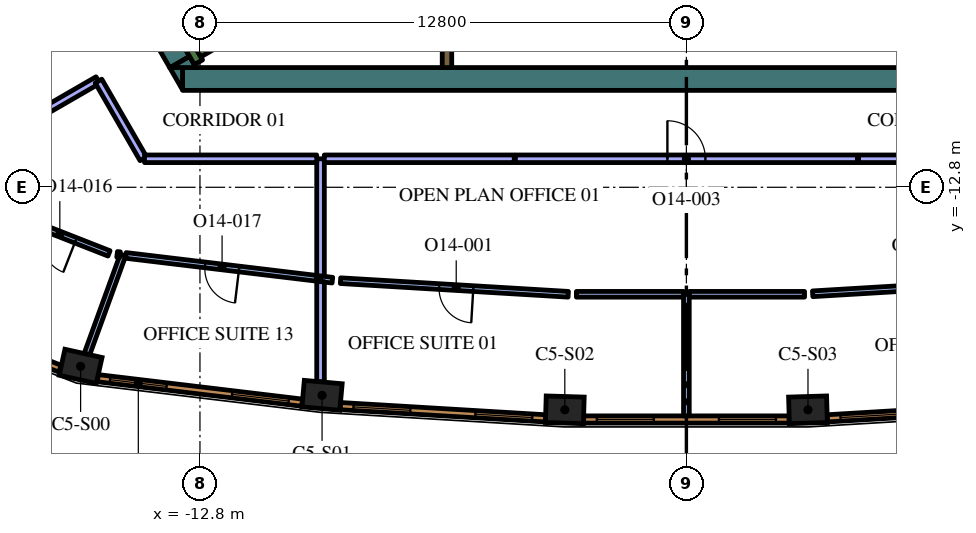
"""IFC4 building model, lengths in metres.
Left out: names, types, materials, properties, quantities, classifications, styles, units other than length and angle.
Written with IfcOpenShell. Run it as: python <this file> out.ifc"""

import sys

from ifc_helpers import new_model, si_unit, direction, frame, frame_2d, origin, origin_2d, place, context, subcontext, project, spatial, polyline, rectangle, outline, extrude, element, fill, save


model = new_model("IFC4")
c1 = context("Model", 3, precision=1e-05, world=origin(), true_north=direction((0.0, 1.0)))
c2 = subcontext(c1, "Body", "Model", "MODEL_VIEW")
j1 = project(units=[si_unit("LENGTHUNIT", "METRE"), si_unit("PLANEANGLEUNIT", "RADIAN")], contexts=[c1])
p1 = place(None, origin())
s1 = spatial("IfcSite", under=j1, at=p1, CompositionType="ELEMENT")
p2 = place(p1, origin())
s2 = spatial("IfcBuilding", under=s1, at=p2, CompositionType="ELEMENT")
p3 = place(p2, frame((0.0, 0.0, 309.0)))
s3 = spatial("IfcBuildingStorey", under=s2, at=p3, CompositionType="ELEMENT", Elevation=309.0)
for number, where, z_axis, x_axis in (
    (1, (-15.941, -17.512, 0.0), (0.0, 0.0, 1.0), (0.976, -0.217, 0.0)),
    (2, (-9.587, -18.274, 0.0), (0.0, 0.0, 1.0), (0.996, -0.089, 0.0)),
    (3, (-3.199, -18.655, 0.0), (0.0, 0.0, 1.0), (1.0, -0.03, 0.0)),
    (4, (3.199, -18.655, 0.0), (0.0, 0.0, 1.0), (1.0, 0.03, 0.0)),
):
    element("IfcColumn", number, at=place(p3, frame(where, z_axis=z_axis, x_axis=x_axis)), inside=s3, PredefinedType="COLUMN", context=c2, shape_type="SweptSolid", body=[
        extrude(rectangle(XDim=1.0, YDim=0.7, at=origin_2d()), origin(), (0.0, 0.0, 1.0), 4.2),
    ])
p4 = place(p3, frame((8.904, -9.95, 0.0), z_axis=(0.0, 0.0, 1.0), x_axis=(-1.0, 0.0, 0.0)))
e5 = element("IfcWall", 5, at=p4, inside=s3, PredefinedType="SOLIDWALL", context=c2, shape_type="SweptSolid", body=[
    extrude(rectangle(XDim=22.161, YDim=0.6, at=frame_2d((11.081, 0.0))), origin(), (0.0, 0.0, 1.0), 4.2),
])
p5 = place(p3, origin())
e6 = element("IfcWall", 6, at=p5, inside=s3, PredefinedType="SOLIDWALL", context=c2, shape_type="SweptSolid", body=[
    extrude(outline(polyline([(-13.597, -9.65), (-13.259, -9.65), (-13.259, -10.236), (-13.597, -9.65)])), origin(), (0.0, 0.0, 1.0), 4.2),
])
p6 = place(p3, frame((-13.333, -9.506, 0.0), z_axis=(0.0, 0.0, 1.0), x_axis=(-0.500019073792, 0.866014391245, 0.0)))
e7 = element("IfcWall", 7, at=p6, inside=s3, PredefinedType="SOLIDWALL", context=c2, shape_type="SweptSolid", body=[
    extrude(rectangle(XDim=3.823, YDim=0.6, at=frame_2d((1.912, 0.0))), origin(), (0.0, 0.0, 1.0), 4.2),
])
e8 = element("IfcWall", 8, at=p5, inside=s3, PredefinedType="SOLIDWALL", context=c2, shape_type="SweptSolid", body=[
    extrude(outline(polyline([(-12.904, -9.65), (-13.58, -9.65), (-13.073, -9.357), (-12.904, -9.65)])), origin(), (0.0, 0.0, 1.0), 4.2),
])
p7 = place(p3, frame((-12.84, -9.511, 0.0), z_axis=(0.0, 0.0, 1.0), x_axis=(-0.499997733992, 0.866026712061, 0.0)))
e9 = element("IfcWall", 9, at=p7, inside=s3, PredefinedType="SOLIDWALL", context=c2, shape_type="SweptSolid", body=[
    extrude(rectangle(XDim=3.634, YDim=0.25, at=frame_2d((1.817, 0.0))), origin(), (0.0, 0.0, 1.0), 4.2),
])
p8 = place(p3, frame((-12.84, -9.261, 0.0), z_axis=(0.0, 0.0, 1.0), x_axis=(0.866016039709, 0.500016218704, 0.0)))
e10 = element("IfcWall", 10, at=p8, inside=s3, PredefinedType="SOLIDWALL", context=c2, shape_type="SweptSolid", body=[
    extrude(rectangle(XDim=7.05, YDim=0.25, at=frame_2d((3.525, 0.0))), origin(), (0.0, 0.0, 1.0), 4.2),
])
p9 = place(p3, frame((-6.3, -8.925, 0.0), z_axis=(0.0, 0.0, 1.0), x_axis=(0.0, -1.0, 0.0)))
e11 = element("IfcWall", 11, at=p9, inside=s3, PredefinedType="SOLIDWALL", context=c2, shape_type="SweptSolid", body=[
    extrude(rectangle(XDim=0.725, YDim=0.25, at=frame_2d((0.363, 0.0))), origin(), (0.0, 0.0, 1.0), 4.2),
])
p10 = place(p3, frame((0.0, -15.615, 0.0), z_axis=(0.0, 0.0, 1.0), x_axis=(0.0, -1.0, 0.0)))
e12 = element("IfcWall", 12, at=p10, inside=s3, PredefinedType="PARTITIONING", context=c2, shape_type="SweptSolid", body=[
    extrude(rectangle(XDim=3.2, YDim=0.15, at=frame_2d((1.6, 0.0))), origin(), (0.0, 0.0, 1.0), 3.55),
])
p11 = place(p3, frame((-9.627, -15.207, 0.0), z_axis=(0.0, 0.0, 1.0), x_axis=(0.992909886905, -0.118869493503, 0.0)))
e13 = element("IfcWall", 13, at=p11, inside=s3, PredefinedType="PARTITIONING", context=c2, shape_type="SweptSolid", body=[
    extrude(rectangle(XDim=0.314, YDim=0.15, at=frame_2d((0.157, 0.0))), origin(), (0.0, 0.0, 1.0), 3.55),
])
p12 = place(p3, frame((-3.109, -15.615, 0.0), z_axis=(0.0, 0.0, 1.0), x_axis=(-0.998221243398, 0.059618363188, 0.0)))
e14 = element("IfcWall", 14, at=p12, inside=s3, PredefinedType="PARTITIONING", context=c2, shape_type="SweptSolid", body=[
    extrude(rectangle(XDim=6.003, YDim=0.15, at=frame_2d((3.002, 0.0))), origin(), (0.0, 0.0, 1.0), 3.55),
])
p13 = place(p12, frame((2.503, 0.0, 0.0)))
e15 = element("IfcOpeningElement", 15, at=p13, cuts=e14, PredefinedType="OPENING", context=c2, shape_type="SweptSolid", body=[
    extrude(rectangle(XDim=0.9, YDim=2.1, at=frame_2d((0.45, 1.05))), frame((0.0, 0.085, 0.0), z_axis=(0.0, -1.0, 0.0), x_axis=(1.0, 0.0, 0.0)), (0.0, 0.0, 1.0), 0.17),
])
p14 = place(p3, frame((-2.895, -15.615, 0.0), z_axis=(0.0, 0.0, 1.0), x_axis=(1.0, 0.0, 0.0)))
e16 = element("IfcWall", 16, at=p14, inside=s3, PredefinedType="PARTITIONING", context=c2, shape_type="SweptSolid", body=[
    extrude(rectangle(XDim=2.82, YDim=0.15, at=frame_2d((1.41, 0.0))), origin(), (0.0, 0.0, 1.0), 3.55),
])
p15 = place(p3, frame((-9.627, -17.919, 0.0), z_axis=(0.0, 0.0, 1.0), x_axis=(0.0, 1.0, 0.0)))
e17 = element("IfcWall", 17, at=p15, inside=s3, PredefinedType="PARTITIONING", context=c2, shape_type="SweptSolid", body=[
    extrude(rectangle(XDim=2.636, YDim=0.2, at=frame_2d((1.318, 0.0))), origin(), (0.0, 0.0, 1.0), 3.55),
])
p16 = place(p3, frame((0.075, -15.615, 0.0), z_axis=(0.0, 0.0, 1.0), x_axis=(1.0, 0.0, 0.0)))
e18 = element("IfcWall", 18, at=p16, inside=s3, PredefinedType="PARTITIONING", context=c2, shape_type="SweptSolid", body=[
    extrude(rectangle(XDim=3.034, YDim=0.15, at=frame_2d((1.517, 0.0))), origin(), (0.0, 0.0, 1.0), 3.55),
])
p17 = place(p3, frame((9.315, -15.244, 0.0), z_axis=(0.0, 0.0, 1.0), x_axis=(-0.998218822372, -0.059658885864, 0.0)))
e19 = element("IfcWall", 19, at=p17, inside=s3, PredefinedType="PARTITIONING", context=c2, shape_type="SweptSolid", body=[
    extrude(rectangle(XDim=6.003, YDim=0.15, at=frame_2d((3.002, 0.0))), origin(), (0.0, 0.0, 1.0), 3.55),
])
p18 = place(p17, frame((2.503, 0.0, 0.0)))
e20 = element("IfcOpeningElement", 20, at=p18, cuts=e19, PredefinedType="OPENING", context=c2, shape_type="SweptSolid", body=[
    extrude(rectangle(XDim=0.9, YDim=2.1, at=frame_2d((0.45, 1.05))), frame((0.0, 0.085, 0.0), z_axis=(0.0, -1.0, 0.0), x_axis=(1.0, 0.0, 0.0)), (0.0, 0.0, 1.0), 0.17),
])
p19 = place(p3, frame((-9.627, -15.132, 0.0), z_axis=(0.0, 0.0, 1.0), x_axis=(0.0, 1.0, 0.0)))
e21 = element("IfcWall", 21, at=p19, inside=s3, PredefinedType="PARTITIONING", context=c2, shape_type="SweptSolid", body=[
    extrude(rectangle(XDim=3.082, YDim=0.2, at=frame_2d((1.541, 0.0))), origin(), (0.0, 0.0, 1.0), 3.55),
])
p20 = place(p3, frame((-4.5, -12.05, 0.0), z_axis=(0.0, 0.0, 1.0), x_axis=(1.0, 0.0, 0.0)))
e22 = element("IfcWall", 22, at=p20, inside=s3, PredefinedType="PARTITIONING", context=c2, shape_type="SweptSolid", body=[
    extrude(rectangle(XDim=9.0, YDim=0.2, at=frame_2d((4.5, 0.0))), origin(), (0.0, 0.0, 1.0), 3.55),
])
p21 = place(p20, frame((4.0, 0.0, 0.0)))
e23 = element("IfcOpeningElement", 23, at=p21, cuts=e22, PredefinedType="OPENING", context=c2, shape_type="SweptSolid", body=[
    extrude(rectangle(XDim=1.0, YDim=2.1, at=frame_2d((0.5, 1.05))), frame((0.0, 0.11, 0.0), z_axis=(0.0, -1.0, 0.0), x_axis=(1.0, 0.0, 0.0)), (0.0, 0.0, 1.0), 0.22),
])
for number, where, z_axis, x_axis in (
    (24, (-9.527, -12.05, 0.0), (0.0, 0.0, 1.0), (1.0, 0.0, 0.0)),
    (25, (4.53, -12.05, 0.0), (0.0, 0.0, 1.0), (1.0, 0.0, 0.0)),
):
    element("IfcWall", number, at=place(p3, frame(where, z_axis=z_axis, x_axis=x_axis)), inside=s3, PredefinedType="PARTITIONING", context=c2, shape_type="SweptSolid", body=[
        extrude(rectangle(XDim=4.997, YDim=0.2, at=frame_2d((2.499, 0.0))), origin(), (0.0, 0.0, 1.0), 3.55),
    ])
p22 = place(p3, frame((-14.826, -14.584, 0.0), z_axis=(0.0, 0.0, 1.0), x_axis=(-0.341806672652, -0.9397702903, 0.0)))
e26 = element("IfcWall", 26, at=p22, inside=s3, PredefinedType="PARTITIONING", context=c2, shape_type="SweptSolid", body=[
    extrude(rectangle(XDim=2.773, YDim=0.15, at=frame_2d((1.387, 0.0))), origin(), (0.0, 0.0, 1.0), 3.55),
])
p23 = place(p3, frame((-15.193, -14.54, 0.0), z_axis=(0.0, 0.0, 1.0), x_axis=(-0.930968616147, 0.36509921357, 0.0)))
e27 = element("IfcWall", 27, at=p23, inside=s3, PredefinedType="PARTITIONING", context=c2, shape_type="SweptSolid", body=[
    extrude(rectangle(XDim=2.841, YDim=0.15, at=frame_2d((1.42, 0.0))), origin(), (0.0, 0.0, 1.0), 3.55),
])
p24 = place(p23, frame((0.941, 0.0, 0.0)))
e28 = element("IfcOpeningElement", 28, at=p24, cuts=e27, PredefinedType="OPENING", context=c2, shape_type="SweptSolid", body=[
    extrude(rectangle(XDim=0.9, YDim=2.1, at=frame_2d((0.45, 1.05))), frame((0.0, 0.085, 0.0), z_axis=(0.0, -1.0, 0.0), x_axis=(1.0, 0.0, 0.0)), (0.0, 0.0, 1.0), 0.17),
])
p25 = place(p3, frame((-14.98, -14.565, 0.0), z_axis=(0.0, 0.0, 1.0), x_axis=(0.992847073299, -0.119393002485, 0.0)))
e29 = element("IfcWall", 29, at=p25, inside=s3, PredefinedType="PARTITIONING", context=c2, shape_type="SweptSolid", body=[
    extrude(rectangle(XDim=0.078, YDim=0.15, at=frame_2d((0.039, 0.0))), origin(), (0.0, 0.0, 1.0), 3.55),
])
p26 = place(p3, frame((-9.727, -15.195, 0.0), z_axis=(0.0, 0.0, 1.0), x_axis=(-0.992892587246, 0.119013907556, 0.0)))
e30 = element("IfcWall", 30, at=p26, inside=s3, PredefinedType="PARTITIONING", context=c2, shape_type="SweptSolid", body=[
    extrude(rectangle(XDim=5.059, YDim=0.15, at=frame_2d((2.529, 0.0))), origin(), (0.0, 0.0, 1.0), 3.55),
])
p27 = place(p26, frame((2.059, 0.0, 0.0)))
e31 = element("IfcOpeningElement", 31, at=p27, cuts=e30, PredefinedType="OPENING", context=c2, shape_type="SweptSolid", body=[
    extrude(rectangle(XDim=0.9, YDim=2.1, at=frame_2d((0.45, 1.05))), frame((0.0, 0.085, 0.0), z_axis=(0.0, -1.0, 0.0), x_axis=(1.0, 0.0, 0.0)), (0.0, 0.0, 1.0), 0.17),
])
for number, where, z_axis, x_axis in (
    (32, (-16.411, -8.436, 0.0), (0.0, 0.0, 1.0), (-0.866, -0.5, 0.0)),
    (33, (-17.364, -11.064, 0.0), (0.0, 0.0, 1.0), (0.866, 0.5, 0.0)),
):
    element("IfcWall", number, at=place(p3, frame(where, z_axis=z_axis, x_axis=x_axis)), inside=s3, PredefinedType="PARTITIONING", context=c2, shape_type="SweptSolid", body=[
        extrude(rectangle(XDim=2.17, YDim=0.2, at=frame_2d((1.085, 0.0))), origin(), (0.0, 0.0, 1.0), 3.55),
    ])
p28 = place(p3, frame((-15.47, -10.005, 0.0), z_axis=(0.0, 0.0, 1.0), x_axis=(0.500053625724, -0.865994440744, 0.0)))
e34 = element("IfcWall", 34, at=p28, inside=s3, PredefinedType="PARTITIONING", context=c2, shape_type="SweptSolid", body=[
    extrude(rectangle(XDim=2.361, YDim=0.2, at=frame_2d((1.181, 0.0))), origin(), (0.0, 0.0, 1.0), 3.55),
])
p29 = place(p3, frame((-14.26, -12.05, 0.0), z_axis=(0.0, 0.0, 1.0), x_axis=(1.0, 0.0, 0.0)))
e35 = element("IfcWall", 35, at=p29, inside=s3, PredefinedType="PARTITIONING", context=c2, shape_type="SweptSolid", body=[
    extrude(rectangle(XDim=4.532, YDim=0.2, at=frame_2d((2.266, 0.0))), origin(), (0.0, 0.0, 1.0), 3.55),
])
p30 = place(p3, frame((-15.487, -17.823, 0.0), z_axis=(0.0, 0.0, 1.0), x_axis=(0.992885582795, -0.119072328769, 0.0)))
e36 = element("IfcWall", 36, at=p30, inside=s3, PredefinedType="SOLIDWALL", context=c2, shape_type="SweptSolid", body=[
    extrude(rectangle(XDim=5.415, YDim=0.19, at=frame_2d((2.708, 0.0))), origin(), (0.0, 0.0, 1.0), 3.95),
])
p31 = place(p30, frame((0.323, 0.0, 0.6)))
e37 = element("IfcOpeningElement", 37, at=p31, cuts=e36, PredefinedType="OPENING", context=c2, shape_type="SweptSolid", body=[
    extrude(rectangle(XDim=1.5, YDim=2.85, at=frame_2d((0.75, 1.425))), frame((0.0, 0.105, 0.0), z_axis=(0.0, -1.0, 0.0), x_axis=(1.0, 0.0, 0.0)), (0.0, 0.0, 1.0), 0.21),
])
p32 = place(p30, frame((3.558, 0.0, 0.6)))
e38 = element("IfcOpeningElement", 38, at=p32, cuts=e36, PredefinedType="OPENING", context=c2, shape_type="SweptSolid", body=[
    extrude(rectangle(XDim=1.5, YDim=2.85, at=frame_2d((0.75, 1.425))), frame((0.0, 0.105, 0.0), z_axis=(0.0, -1.0, 0.0), x_axis=(1.0, 0.0, 0.0)), (0.0, 0.0, 1.0), 0.21),
])
p33 = place(p3, frame((-9.107, -18.558, 0.0), z_axis=(0.0, 0.0, 1.0), x_axis=(0.998221492823, -0.059614186786, 0.0)))
e39 = element("IfcWall", 39, at=p33, inside=s3, PredefinedType="SOLIDWALL", context=c2, shape_type="SweptSolid", body=[
    extrude(rectangle(XDim=5.406, YDim=0.19, at=frame_2d((2.703, 0.0))), origin(), (0.0, 0.0, 1.0), 3.95),
])
p34 = place(p33, frame((0.346, 0.0, 0.6)))
e40 = element("IfcOpeningElement", 40, at=p34, cuts=e39, PredefinedType="OPENING", context=c2, shape_type="SweptSolid", body=[
    extrude(rectangle(XDim=1.5, YDim=2.85, at=frame_2d((0.75, 1.425))), frame((0.0, 0.105, 0.0), z_axis=(0.0, -1.0, 0.0), x_axis=(1.0, 0.0, 0.0)), (0.0, 0.0, 1.0), 0.21),
])
p35 = place(p33, frame((3.559, 0.0, 0.6)))
e41 = element("IfcOpeningElement", 41, at=p35, cuts=e39, PredefinedType="OPENING", context=c2, shape_type="SweptSolid", body=[
    extrude(rectangle(XDim=1.5, YDim=2.85, at=frame_2d((0.75, 1.425))), frame((0.0, 0.105, 0.0), z_axis=(0.0, -1.0, 0.0), x_axis=(1.0, 0.0, 0.0)), (0.0, 0.0, 1.0), 0.21),
])
p36 = place(p3, frame((-2.703, -18.91, 0.0), z_axis=(0.0, 0.0, 1.0), x_axis=(1.0, 0.0, 0.0)))
e42 = element("IfcWall", 42, at=p36, inside=s3, PredefinedType="SOLIDWALL", context=c2, shape_type="SweptSolid", body=[
    extrude(rectangle(XDim=5.406, YDim=0.19, at=frame_2d((2.703, 0.0))), origin(), (0.0, 0.0, 1.0), 3.95),
])
p37 = place(p36, frame((0.346, 0.0, 0.6)))
e43 = element("IfcOpeningElement", 43, at=p37, cuts=e42, PredefinedType="OPENING", context=c2, shape_type="SweptSolid", body=[
    extrude(rectangle(XDim=1.5, YDim=2.85, at=frame_2d((0.75, 1.425))), frame((0.0, 0.105, 0.0), z_axis=(0.0, -1.0, 0.0), x_axis=(1.0, 0.0, 0.0)), (0.0, 0.0, 1.0), 0.21),
])
p38 = place(p36, frame((3.56, 0.0, 0.6)))
e44 = element("IfcOpeningElement", 44, at=p38, cuts=e42, PredefinedType="OPENING", context=c2, shape_type="SweptSolid", body=[
    extrude(rectangle(XDim=1.5, YDim=2.85, at=frame_2d((0.75, 1.425))), frame((0.0, 0.105, 0.0), z_axis=(0.0, -1.0, 0.0), x_axis=(1.0, 0.0, 0.0)), (0.0, 0.0, 1.0), 0.21),
])
p39 = place(p3, frame((3.71, -18.88, 0.0), z_axis=(0.0, 0.0, 1.0), x_axis=(0.998221492823, 0.059614186786, 0.0)))
e45 = element("IfcWall", 45, at=p39, inside=s3, PredefinedType="SOLIDWALL", context=c2, shape_type="SweptSolid", body=[
    extrude(rectangle(XDim=5.406, YDim=0.19, at=frame_2d((2.703, 0.0))), origin(), (0.0, 0.0, 1.0), 3.95),
])
p40 = place(p39, frame((0.346, 0.0, 0.6)))
e46 = element("IfcOpeningElement", 46, at=p40, cuts=e45, PredefinedType="OPENING", context=c2, shape_type="SweptSolid", body=[
    extrude(rectangle(XDim=1.5, YDim=2.85, at=frame_2d((0.75, 1.425))), frame((0.0, 0.105, 0.0), z_axis=(0.0, -1.0, 0.0), x_axis=(1.0, 0.0, 0.0)), (0.0, 0.0, 1.0), 0.21),
])
p41 = place(p39, frame((3.559, 0.0, 0.6)))
e47 = element("IfcOpeningElement", 47, at=p41, cuts=e45, PredefinedType="OPENING", context=c2, shape_type="SweptSolid", body=[
    extrude(rectangle(XDim=1.5, YDim=2.85, at=frame_2d((0.75, 1.425))), frame((0.0, 0.105, 0.0), z_axis=(0.0, -1.0, 0.0), x_axis=(1.0, 0.0, 0.0)), (0.0, 0.0, 1.0), 0.21),
])
p42 = place(p3, frame((-19.496, -16.392, 0.0), z_axis=(0.0, 0.0, 1.0), x_axis=(0.93100888477, -0.364996515709, 0.0)))
e48 = element("IfcWall", 48, at=p42, inside=s3, PredefinedType="SOLIDWALL", context=c2, shape_type="SweptSolid", body=[
    extrude(rectangle(XDim=3.237, YDim=0.19, at=frame_2d((1.618, 0.0))), origin(), (0.0, 0.0, 1.0), 3.95),
])
p43 = place(p42, frame((1.068, 0.0, 0.6)))
e49 = element("IfcOpeningElement", 49, at=p43, cuts=e48, PredefinedType="OPENING", context=c2, shape_type="SweptSolid", body=[
    extrude(rectangle(XDim=1.1, YDim=2.85, at=frame_2d((0.55, 1.425))), frame((0.0, 0.105, 0.0), z_axis=(0.0, -1.0, 0.0), x_axis=(1.0, 0.0, 0.0)), (0.0, 0.0, 1.0), 0.21),
])
p44 = place(p13, origin())
e50 = element("IfcDoor", 50, at=p44, inside=s3, OperationType="SINGLE_SWING_LEFT", PredefinedType="DOOR", context=c2, shape_type="SweptSolid", body=[
    extrude(rectangle(XDim=0.9, YDim=2.1, at=frame_2d((0.45, 1.05))), frame((0.0, 0.025, 0.0), z_axis=(0.0, -1.0, 0.0), x_axis=(1.0, 0.0, 0.0)), (0.0, 0.0, 1.0), 0.05),
])
fill(e15, e50)
p45 = place(p21, origin())
e51 = element("IfcDoor", 51, at=p45, inside=s3, OperationType="SINGLE_SWING_RIGHT", PredefinedType="DOOR", context=c2, shape_type="SweptSolid", body=[
    extrude(rectangle(XDim=1.0, YDim=2.1, at=frame_2d((0.5, 1.05))), frame((0.0, 0.025, 0.0), z_axis=(0.0, -1.0, 0.0), x_axis=(1.0, 0.0, 0.0)), (0.0, 0.0, 1.0), 0.05),
])
fill(e23, e51)
p46 = place(p24, origin())
e52 = element("IfcDoor", 52, at=p46, inside=s3, OperationType="SINGLE_SWING_LEFT", PredefinedType="DOOR", context=c2, shape_type="SweptSolid", body=[
    extrude(rectangle(XDim=0.9, YDim=2.1, at=frame_2d((0.45, 1.05))), frame((0.0, 0.025, 0.0), z_axis=(0.0, -1.0, 0.0), x_axis=(1.0, 0.0, 0.0)), (0.0, 0.0, 1.0), 0.05),
])
fill(e28, e52)
p47 = place(p27, origin())
e53 = element("IfcDoor", 53, at=p47, inside=s3, OperationType="SINGLE_SWING_LEFT", PredefinedType="DOOR", context=c2, shape_type="SweptSolid", body=[
    extrude(rectangle(XDim=0.9, YDim=2.1, at=frame_2d((0.45, 1.05))), frame((0.0, 0.025, 0.0), z_axis=(0.0, -1.0, 0.0), x_axis=(1.0, 0.0, 0.0)), (0.0, 0.0, 1.0), 0.05),
])
fill(e31, e53)
p48 = place(p31, origin())
e54 = element("IfcWindow", 54, at=p48, inside=s3, PartitioningType="SINGLE_PANEL", PredefinedType="WINDOW", context=c2, shape_type="SweptSolid", body=[
    extrude(rectangle(XDim=1.5, YDim=2.85, at=frame_2d((0.75, 1.425))), frame((0.0, 0.045, 0.0), z_axis=(0.0, -1.0, 0.0), x_axis=(1.0, 0.0, 0.0)), (0.0, 0.0, 1.0), 0.06),
])
fill(e37, e54)
p49 = place(p32, origin())
e55 = element("IfcWindow", 55, at=p49, inside=s3, PartitioningType="SINGLE_PANEL", PredefinedType="WINDOW", context=c2, shape_type="SweptSolid", body=[
    extrude(rectangle(XDim=1.5, YDim=2.85, at=frame_2d((0.75, 1.425))), frame((0.0, 0.045, 0.0), z_axis=(0.0, -1.0, 0.0), x_axis=(1.0, 0.0, 0.0)), (0.0, 0.0, 1.0), 0.06),
])
fill(e38, e55)
p50 = place(p34, origin())
e56 = element("IfcWindow", 56, at=p50, inside=s3, PartitioningType="SINGLE_PANEL", PredefinedType="WINDOW", context=c2, shape_type="SweptSolid", body=[
    extrude(rectangle(XDim=1.5, YDim=2.85, at=frame_2d((0.75, 1.425))), frame((0.0, 0.045, 0.0), z_axis=(0.0, -1.0, 0.0), x_axis=(1.0, 0.0, 0.0)), (0.0, 0.0, 1.0), 0.06),
])
fill(e40, e56)
p51 = place(p35, origin())
e57 = element("IfcWindow", 57, at=p51, inside=s3, PartitioningType="SINGLE_PANEL", PredefinedType="WINDOW", context=c2, shape_type="SweptSolid", body=[
    extrude(rectangle(XDim=1.5, YDim=2.85, at=frame_2d((0.75, 1.425))), frame((0.0, 0.045, 0.0), z_axis=(0.0, -1.0, 0.0), x_axis=(1.0, 0.0, 0.0)), (0.0, 0.0, 1.0), 0.06),
])
fill(e41, e57)
p52 = place(p37, origin())
e58 = element("IfcWindow", 58, at=p52, inside=s3, PartitioningType="SINGLE_PANEL", PredefinedType="WINDOW", context=c2, shape_type="SweptSolid", body=[
    extrude(rectangle(XDim=1.5, YDim=2.85, at=frame_2d((0.75, 1.425))), frame((0.0, 0.045, 0.0), z_axis=(0.0, -1.0, 0.0), x_axis=(1.0, 0.0, 0.0)), (0.0, 0.0, 1.0), 0.06),
])
fill(e43, e58)
p53 = place(p38, origin())
e59 = element("IfcWindow", 59, at=p53, inside=s3, PartitioningType="SINGLE_PANEL", PredefinedType="WINDOW", context=c2, shape_type="SweptSolid", body=[
    extrude(rectangle(XDim=1.5, YDim=2.85, at=frame_2d((0.75, 1.425))), frame((0.0, 0.045, 0.0), z_axis=(0.0, -1.0, 0.0), x_axis=(1.0, 0.0, 0.0)), (0.0, 0.0, 1.0), 0.06),
])
fill(e44, e59)
p54 = place(p40, origin())
e60 = element("IfcWindow", 60, at=p54, inside=s3, PartitioningType="SINGLE_PANEL", PredefinedType="WINDOW", context=c2, shape_type="SweptSolid", body=[
    extrude(rectangle(XDim=1.5, YDim=2.85, at=frame_2d((0.75, 1.425))), frame((0.0, 0.045, 0.0), z_axis=(0.0, -1.0, 0.0), x_axis=(1.0, 0.0, 0.0)), (0.0, 0.0, 1.0), 0.06),
])
fill(e46, e60)
save(model, sys.argv[1])
